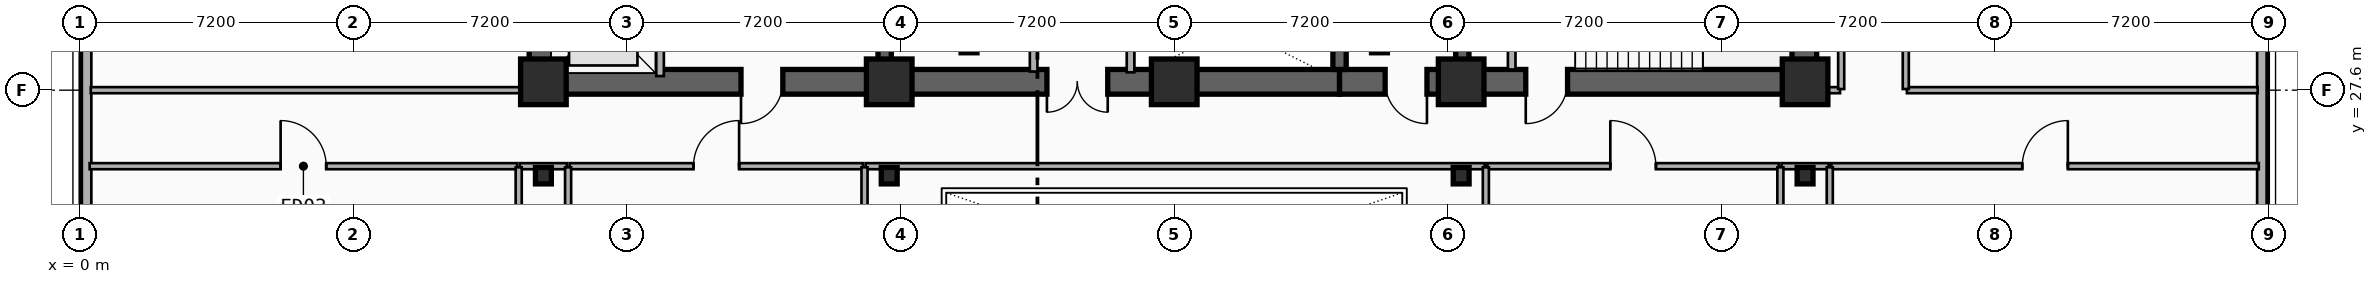
"""IFC4 building model, lengths in metres.
Left out: names, types, materials, properties, quantities, classifications, styles, units other than length and angle.
Written with IfcOpenShell. Run it as: python <this file> out.ifc"""

import sys

from ifc_helpers import new_model, si_unit, direction, frame, frame_2d, origin, origin_2d, place, context, subcontext, project, spatial, rectangle, i_section, extrude, element, fill, save


model = new_model("IFC4")
c1 = context("Model", 3, precision=1e-05, world=origin(), true_north=direction((0.0, 1.0)))
c2 = subcontext(c1, "Body", "Model", "MODEL_VIEW")
j1 = project(units=[si_unit("LENGTHUNIT", "METRE"), si_unit("PLANEANGLEUNIT", "RADIAN")], contexts=[c1])
p1 = place(None, origin())
s1 = spatial("IfcSite", under=j1, at=p1, CompositionType="ELEMENT")
p2 = place(p1, origin())
s2 = spatial("IfcBuilding", under=s1, at=p2, CompositionType="ELEMENT")
p3 = place(p2, frame((0.0, 0.0, 132.9)))
s3 = spatial("IfcBuildingStorey", under=s2, at=p3, CompositionType="ELEMENT", Elevation=132.9)
p4 = place(p3, frame((21.18, 27.82, 0.0), z_axis=(0.0, 0.0, 1.0), x_axis=(-1.0, 0.0, 0.0)))
e1 = element("IfcWall", 1, at=p4, inside=s3, PredefinedType="SHEAR", context=c2, shape_type="SweptSolid", body=[
    extrude(rectangle(XDim=9.03, YDim=0.65, at=frame_2d((4.515, 0.0))), origin(), (0.0, 0.0, 1.0), 4.8),
])
p5 = place(p4, frame((2.68, 0.0, 0.0)))
e2 = element("IfcOpeningElement", 2, at=p5, cuts=e1, PredefinedType="OPENING", context=c2, shape_type="SweptSolid", body=[
    extrude(rectangle(XDim=1.1, YDim=2.15, at=frame_2d((0.55, 1.075))), frame((0.0, 0.335, 0.0), z_axis=(0.0, -1.0, 0.0), x_axis=(1.0, 0.0, 0.0)), (0.0, 0.0, 1.0), 0.67),
])
p6 = place(p3, frame((33.15, 27.82, 0.0), z_axis=(0.0, 0.0, 1.0), x_axis=(-1.0, 0.0, 0.0)))
e3 = element("IfcWall", 3, at=p6, inside=s3, PredefinedType="SHEAR", context=c2, shape_type="SweptSolid", body=[
    extrude(rectangle(XDim=11.97, YDim=0.65, at=frame_2d((5.985, 0.0))), origin(), (0.0, 0.0, 1.0), 4.8),
])
p7 = place(p6, frame((6.1, 0.0, 0.0)))
e4 = element("IfcOpeningElement", 4, at=p7, cuts=e3, PredefinedType="OPENING", context=c2, shape_type="SweptSolid", body=[
    extrude(rectangle(XDim=1.6, YDim=2.2, at=frame_2d((0.8, 1.1))), frame((0.0, 0.335, 0.0), z_axis=(0.0, -1.0, 0.0), x_axis=(1.0, 0.0, 0.0)), (0.0, 0.0, 1.0), 0.67),
])
p8 = place(p3, frame((45.38, 27.82, 0.0), z_axis=(0.0, 0.0, 1.0), x_axis=(-1.0, 0.0, 0.0)))
e5 = element("IfcWall", 5, at=p8, inside=s3, PredefinedType="SHEAR", context=c2, shape_type="SweptSolid", body=[
    extrude(rectangle(XDim=12.23, YDim=0.65, at=frame_2d((6.115, 0.0))), origin(), (0.0, 0.0, 1.0), 4.8),
])
p9 = place(p8, frame((9.93, 0.0, 0.0)))
e6 = element("IfcOpeningElement", 6, at=p9, cuts=e5, PredefinedType="OPENING", context=c2, shape_type="SweptSolid", body=[
    extrude(rectangle(XDim=1.1, YDim=2.15, at=frame_2d((0.55, 1.075))), frame((0.0, 0.335, 0.0), z_axis=(0.0, -1.0, 0.0), x_axis=(1.0, 0.0, 0.0)), (0.0, 0.0, 1.0), 0.67),
])
p10 = place(p8, frame((6.23, 0.0, 0.0)))
e7 = element("IfcOpeningElement", 7, at=p10, cuts=e5, PredefinedType="OPENING", context=c2, shape_type="SweptSolid", body=[
    extrude(rectangle(XDim=1.1, YDim=2.15, at=frame_2d((0.55, 1.075))), frame((0.0, 0.335, 0.0), z_axis=(0.0, -1.0, 0.0), x_axis=(1.0, 0.0, 0.0)), (0.0, 0.0, 1.0), 0.67),
])
for number, where, z_axis, x_axis in (
    (8, (12.15, 28.145, 0.0), (0.0, 0.0, 1.0), (0.0, 1.0, 0.0)),
    (9, (45.38, 28.145, 0.0), (0.0, 0.0, 1.0), (0.0, 1.0, 0.0)),
):
    element("IfcWall", number, at=place(p3, frame(where, z_axis=z_axis, x_axis=x_axis)), inside=s3, PredefinedType="SHEAR", context=c2, shape_type="SweptSolid", body=[
        extrude(rectangle(XDim=8.58, YDim=0.65, at=frame_2d((4.29, 0.0))), origin(), (0.0, 0.0, 1.0), 4.8),
    ])
for number, where, z_axis, x_axis in (
    (10, (21.18, 28.145, 0.0), (0.0, 0.0, 1.0), (0.0, 1.0, 0.0)),
    (11, (33.15, 28.145, 0.0), (0.0, 0.0, 1.0), (0.0, 1.0, 0.0)),
):
    element("IfcWall", number, at=place(p3, frame(where, z_axis=z_axis, x_axis=x_axis)), inside=s3, PredefinedType="SHEAR", context=c2, shape_type="SweptSolid", body=[
        extrude(rectangle(XDim=8.58, YDim=0.35, at=frame_2d((4.29, 0.0))), origin(), (0.0, 0.0, 1.0), 4.8),
    ])
p11 = place(p3, frame((36.38, 28.145, 0.0), z_axis=(0.0, 0.0, 1.0), x_axis=(0.0, 1.0, 0.0)))
e12 = element("IfcWall", 12, at=p11, inside=s3, PredefinedType="SHEAR", context=c2, shape_type="SweptSolid", body=[
    extrude(rectangle(XDim=8.58, YDim=0.35, at=frame_2d((4.29, 0.0))), origin(), (0.0, 0.0, 1.0), 4.8),
])
p12 = place(p11, frame((3.635, 0.0, 0.0)))
e13 = element("IfcOpeningElement", 13, at=p12, cuts=e12, PredefinedType="OPENING", context=c2, shape_type="SweptSolid", body=[
    extrude(rectangle(XDim=1.1, YDim=2.15, at=frame_2d((0.55, 1.075))), frame((0.0, 0.185, 0.0), z_axis=(0.0, -1.0, 0.0), x_axis=(1.0, 0.0, 0.0)), (0.0, 0.0, 1.0), 0.37),
])
for number, where, z_axis, x_axis in (
    (14, (23.4, 28.8, 0.0), (0.0, 0.0, 1.0), (1.0, 0.0, 0.0)),
    (15, (34.2, 28.8, 0.0), (0.0, 0.0, 1.0), (1.0, 0.0, 0.0)),
):
    element("IfcColumn", number, at=place(p3, frame(where, z_axis=z_axis, x_axis=x_axis)), inside=s3, PredefinedType="COLUMN", context=c2, shape_type="SweptSolid", body=[
        extrude(i_section(OverallWidth=0.418, OverallDepth=0.432, WebThickness=0.035, FlangeThickness=0.056, FilletRadius=0.015, at=origin_2d()), origin(), (0.0, 0.0, 1.0), 4.8),
    ])
for number, where, z_axis, x_axis in (
    (16, (12.2, 27.82, 0.0), (0.0, 0.0, 1.0), (1.0, 0.0, 0.0)),
    (17, (21.3, 27.82, 0.0), (0.0, 0.0, 1.0), (1.0, 0.0, 0.0)),
    (18, (28.8, 27.82, 0.0), (0.0, 0.0, 1.0), (1.0, 0.0, 0.0)),
    (19, (36.35, 27.82, 0.0), (0.0, 0.0, 1.0), (1.0, 0.0, 0.0)),
    (20, (45.4, 27.82, 0.0), (0.0, 0.0, 1.0), (1.0, 0.0, 0.0)),
):
    element("IfcColumn", number, at=place(p3, frame(where, z_axis=z_axis, x_axis=x_axis)), inside=s3, PredefinedType="COLUMN", context=c2, shape_type="SweptSolid", body=[
        extrude(rectangle(XDim=1.2, YDim=1.2, at=origin_2d()), origin(), (0.0, 0.0, 1.0), 4.8),
    ])
for number, where, z_axis, x_axis in (
    (21, (12.2, 25.35, 0.0), (0.0, 0.0, 1.0), (1.0, 0.0, 0.0)),
    (22, (21.3, 25.35, 0.0), (0.0, 0.0, 1.0), (1.0, 0.0, 0.0)),
    (23, (36.35, 25.35, 0.0), (0.0, 0.0, 1.0), (1.0, 0.0, 0.0)),
    (24, (45.4, 25.35, 0.0), (0.0, 0.0, 1.0), (1.0, 0.0, 0.0)),
):
    element("IfcColumn", number, at=place(p3, frame(where, z_axis=z_axis, x_axis=x_axis)), inside=s3, PredefinedType="COLUMN", context=c2, shape_type="SweptSolid", body=[
        extrude(i_section(OverallWidth=0.418, OverallDepth=0.432, WebThickness=0.035, FlangeThickness=0.056, FilletRadius=0.015, at=origin_2d()), origin(), (0.0, 0.0, 1.0), 4.8),
    ])
for number, where, z_axis, x_axis in (
    (25, (57.42, 39.0, 0.0), (0.0, 0.0, 1.0), (0.0, -1.0, 0.0)),
    (26, (0.18, 21.0, 0.0), (0.0, 0.0, 1.0), (0.0, 1.0, 0.0)),
):
    element("IfcWall", number, at=place(p3, frame(where, z_axis=z_axis, x_axis=x_axis)), inside=s3, PredefinedType="SOLIDWALL", context=c2, shape_type="SweptSolid", body=[
        extrude(rectangle(XDim=18.0, YDim=0.25, at=frame_2d((9.0, 0.0))), origin(), (0.0, 0.0, 1.0), 4.48),
    ])
p13 = place(p3, frame((15.27, 27.97, 0.0), z_axis=(0.0, 0.0, 1.0), x_axis=(0.0, 1.0, 0.0)))
e27 = element("IfcWall", 27, at=p13, inside=s3, PredefinedType="PARTITIONING", context=c2, shape_type="SweptSolid", body=[
    extrude(rectangle(XDim=2.96, YDim=0.2, at=frame_2d((1.48, 0.0))), origin(), (0.0, 0.0, 1.0), 3.452),
])
p14 = place(p13, frame((0.93, 0.0, 0.0)))
e28 = element("IfcOpeningElement", 28, at=p14, cuts=e27, PredefinedType="OPENING", context=c2, shape_type="SweptSolid", body=[
    extrude(rectangle(XDim=1.1, YDim=2.15, at=frame_2d((0.55, 1.075))), frame((0.0, 0.11, 0.0), z_axis=(0.0, -1.0, 0.0), x_axis=(1.0, 0.0, 0.0)), (0.0, 0.0, 1.0), 0.22),
])
p15 = place(p3, frame((27.65, 28.07, 0.0), z_axis=(0.0, 0.0, 1.0), x_axis=(0.0, 1.0, 0.0)))
e29 = element("IfcWall", 29, at=p15, inside=s3, PredefinedType="PARTITIONING", context=c2, shape_type="SweptSolid", body=[
    extrude(rectangle(XDim=2.58, YDim=0.2, at=frame_2d((1.29, 0.0))), origin(), (0.0, 0.0, 1.0), 3.452),
])
p16 = place(p3, frame((37.68, 28.145, 0.0), z_axis=(0.0, 0.0, 1.0), x_axis=(0.0, 1.0, 0.0)))
e30 = element("IfcWall", 30, at=p16, inside=s3, PredefinedType="PARTITIONING", context=c2, shape_type="SweptSolid", body=[
    extrude(rectangle(XDim=3.105, YDim=0.2, at=frame_2d((1.552, 0.0))), origin(), (0.0, 0.0, 1.0), 3.86),
])
p17 = place(p3, frame((25.1, 28.09, 0.0), z_axis=(0.0, 0.0, 1.0), x_axis=(0.0, 1.0, 0.0)))
e31 = element("IfcWall", 31, at=p17, inside=s3, PredefinedType="PARTITIONING", context=c2, shape_type="SweptSolid", body=[
    extrude(rectangle(XDim=3.82, YDim=0.2, at=frame_2d((1.91, 0.0))), origin(), (0.0, 0.0, 1.0), 3.86),
])
p18 = place(p17, frame((1.31, 0.0, 0.0)))
e32 = element("IfcOpeningElement", 32, at=p18, cuts=e31, PredefinedType="OPENING", context=c2, shape_type="SweptSolid", body=[
    extrude(rectangle(XDim=1.2, YDim=2.15, at=frame_2d((0.6, 1.075))), frame((0.0, 0.11, 0.0), z_axis=(0.0, -1.0, 0.0), x_axis=(1.0, 0.0, 0.0)), (0.0, 0.0, 1.0), 0.22),
])
p19 = place(p3, frame((0.26, 25.6, 0.0), z_axis=(0.0, 0.0, 1.0), x_axis=(1.0, 0.0, 0.0)))
e33 = element("IfcWall", 33, at=p19, inside=s3, PredefinedType="PARTITIONING", context=c2, shape_type="SweptSolid", body=[
    extrude(rectangle(XDim=11.25, YDim=0.16, at=frame_2d((5.625, 0.0))), origin(), (0.0, 0.0, 1.0), 3.81),
])
p20 = place(p19, frame((5.025, 0.0, 0.0)))
e34 = element("IfcOpeningElement", 34, at=p20, cuts=e33, PredefinedType="OPENING", context=c2, shape_type="SweptSolid", body=[
    extrude(rectangle(XDim=1.2, YDim=2.15, at=frame_2d((0.6, 1.075))), frame((0.0, 0.09, 0.0), z_axis=(0.0, -1.0, 0.0), x_axis=(1.0, 0.0, 0.0)), (0.0, 0.0, 1.0), 0.18),
])
p21 = place(p3, frame((12.89, 25.6, 0.0), z_axis=(0.0, 0.0, 1.0), x_axis=(1.0, 0.0, 0.0)))
e35 = element("IfcWall", 35, at=p21, inside=s3, PredefinedType="PARTITIONING", context=c2, shape_type="SweptSolid", body=[
    extrude(rectangle(XDim=7.72, YDim=0.16, at=frame_2d((3.86, 0.0))), origin(), (0.0, 0.0, 1.0), 4.48),
])
p22 = place(p21, frame((3.26, 0.0, 0.0)))
e36 = element("IfcOpeningElement", 36, at=p22, cuts=e35, PredefinedType="OPENING", context=c2, shape_type="SweptSolid", body=[
    extrude(rectangle(XDim=1.2, YDim=2.15, at=frame_2d((0.6, 1.075))), frame((0.0, 0.09, 0.0), z_axis=(0.0, -1.0, 0.0), x_axis=(1.0, 0.0, 0.0)), (0.0, 0.0, 1.0), 0.18),
])
p23 = place(p3, frame((37.04, 25.6, 0.0), z_axis=(0.0, 0.0, 1.0), x_axis=(1.0, 0.0, 0.0)))
e37 = element("IfcWall", 37, at=p23, inside=s3, PredefinedType="PARTITIONING", context=c2, shape_type="SweptSolid", body=[
    extrude(rectangle(XDim=7.67, YDim=0.16, at=frame_2d((3.835, 0.0))), origin(), (0.0, 0.0, 1.0), 4.48),
])
p24 = place(p23, frame((3.235, 0.0, 0.0)))
e38 = element("IfcOpeningElement", 38, at=p24, cuts=e37, PredefinedType="OPENING", context=c2, shape_type="SweptSolid", body=[
    extrude(rectangle(XDim=1.2, YDim=2.15, at=frame_2d((0.6, 1.075))), frame((0.0, 0.09, 0.0), z_axis=(0.0, -1.0, 0.0), x_axis=(1.0, 0.0, 0.0)), (0.0, 0.0, 1.0), 0.18),
])
p25 = place(p3, frame((46.09, 25.6, 0.0), z_axis=(0.0, 0.0, 1.0), x_axis=(1.0, 0.0, 0.0)))
e39 = element("IfcWall", 39, at=p25, inside=s3, PredefinedType="PARTITIONING", context=c2, shape_type="SweptSolid", body=[
    extrude(rectangle(XDim=11.25, YDim=0.16, at=frame_2d((5.625, 0.0))), origin(), (0.0, 0.0, 1.0), 3.81),
])
p26 = place(p25, frame((5.025, 0.0, 0.0)))
e40 = element("IfcOpeningElement", 40, at=p26, cuts=e39, PredefinedType="OPENING", context=c2, shape_type="SweptSolid", body=[
    extrude(rectangle(XDim=1.2, YDim=2.15, at=frame_2d((0.6, 1.075))), frame((0.0, 0.09, 0.0), z_axis=(0.0, -1.0, 0.0), x_axis=(1.0, 0.0, 0.0)), (0.0, 0.0, 1.0), 0.18),
])
p27 = place(p3, frame((11.58, 25.6, 0.0), z_axis=(0.0, 0.0, 1.0), x_axis=(1.0, 0.0, 0.0)))
e41 = element("IfcWall", 41, at=p27, inside=s3, PredefinedType="PARTITIONING", context=c2, shape_type="SweptSolid", body=[
    extrude(rectangle(XDim=1.24, YDim=0.16, at=frame_2d((0.62, 0.0))), origin(), (0.0, 0.0, 1.0), 3.646),
])
p28 = place(p3, frame((20.68, 25.6, 0.0), z_axis=(0.0, 0.0, 1.0), x_axis=(1.0, 0.0, 0.0)))
e42 = element("IfcWall", 42, at=p28, inside=s3, PredefinedType="PARTITIONING", context=c2, shape_type="SweptSolid", body=[
    extrude(rectangle(XDim=16.29, YDim=0.16, at=frame_2d((8.145, 0.0))), origin(), (0.0, 0.0, 1.0), 3.646),
])
p29 = place(p3, frame((44.78, 25.6, 0.0), z_axis=(0.0, 0.0, 1.0), x_axis=(1.0, 0.0, 0.0)))
e43 = element("IfcWall", 43, at=p29, inside=s3, PredefinedType="PARTITIONING", context=c2, shape_type="SweptSolid", body=[
    extrude(rectangle(XDim=1.24, YDim=0.16, at=frame_2d((0.62, 0.0))), origin(), (0.0, 0.0, 1.0), 3.646),
])
p30 = place(p3, frame((0.29, 27.6, 0.0), z_axis=(0.0, 0.0, 1.0), x_axis=(1.0, 0.0, 0.0)))
e44 = element("IfcWall", 44, at=p30, inside=s3, PredefinedType="PARTITIONING", context=c2, shape_type="SweptSolid", body=[
    extrude(rectangle(XDim=11.83, YDim=0.16, at=frame_2d((5.915, 0.0))), origin(), (0.0, 0.0, 1.0), 3.452),
])
p31 = place(p3, frame((45.41, 27.6, 0.0), z_axis=(0.0, 0.0, 1.0), x_axis=(1.0, 0.0, 0.0)))
e45 = element("IfcWall", 45, at=p31, inside=s3, PredefinedType="PARTITIONING", context=c2, shape_type="SweptSolid", body=[
    extrude(rectangle(XDim=0.91, YDim=0.16, at=frame_2d((0.455, 0.0))), origin(), (0.0, 0.0, 1.0), 3.452),
])
p32 = place(p3, frame((48.08, 27.6, 0.0), z_axis=(0.0, 0.0, 1.0), x_axis=(1.0, 0.0, 0.0)))
e46 = element("IfcWall", 46, at=p32, inside=s3, PredefinedType="PARTITIONING", context=c2, shape_type="SweptSolid", body=[
    extrude(rectangle(XDim=9.23, YDim=0.16, at=frame_2d((4.615, 0.0))), origin(), (0.0, 0.0, 1.0), 3.81),
])
for number, where, z_axis, x_axis in (
    (47, (46.35, 27.63, 0.0), (0.0, 0.0, 1.0), (0.0, 1.0, 0.0)),
    (48, (48.05, 27.63, 0.0), (0.0, 0.0, 1.0), (0.0, 1.0, 0.0)),
):
    element("IfcWall", number, at=place(p3, frame(where, z_axis=z_axis, x_axis=x_axis)), inside=s3, PredefinedType="PARTITIONING", context=c2, shape_type="SweptSolid", body=[
        extrude(rectangle(XDim=10.24, YDim=0.16, at=frame_2d((5.12, 0.0))), origin(), (0.0, 0.0, 1.0), 3.96),
    ])
p33 = place(p3, frame((11.55, 17.09, 0.0), z_axis=(0.0, 0.0, 1.0), x_axis=(0.0, 1.0, 0.0)))
e49 = element("IfcWall", 49, at=p33, inside=s3, PredefinedType="PARTITIONING", context=c2, shape_type="SweptSolid", body=[
    extrude(rectangle(XDim=8.48, YDim=0.16, at=frame_2d((4.24, 0.0))), origin(), (0.0, 0.0, 1.0), 3.96),
])
for number, where, z_axis, x_axis in (
    (50, (12.85, 17.09, 0.0), (0.0, 0.0, 1.0), (0.0, 1.0, 0.0)),
    (51, (20.65, 17.09, 0.0), (0.0, 0.0, 1.0), (0.0, 1.0, 0.0)),
    (52, (37.0, 17.09, 0.0), (0.0, 0.0, 1.0), (0.0, 1.0, 0.0)),
    (53, (44.75, 17.09, 0.0), (0.0, 0.0, 1.0), (0.0, 1.0, 0.0)),
):
    element("IfcWall", number, at=place(p3, frame(where, z_axis=z_axis, x_axis=x_axis)), inside=s3, PredefinedType="PARTITIONING", context=c2, shape_type="SweptSolid", body=[
        extrude(rectangle(XDim=8.48, YDim=0.16, at=frame_2d((4.24, 0.0))), origin(), (0.0, 0.0, 1.0), 3.97),
    ])
p34 = place(p3, frame((46.05, 17.09, 0.0), z_axis=(0.0, 0.0, 1.0), x_axis=(0.0, 1.0, 0.0)))
e54 = element("IfcWall", 54, at=p34, inside=s3, PredefinedType="PARTITIONING", context=c2, shape_type="SweptSolid", body=[
    extrude(rectangle(XDim=8.48, YDim=0.16, at=frame_2d((4.24, 0.0))), origin(), (0.0, 0.0, 1.0), 3.96),
])
p35 = place(p5, origin())
e55 = element("IfcDoor", 55, at=p35, inside=s3, OperationType="SINGLE_SWING_RIGHT", PredefinedType="DOOR", context=c2, shape_type="SweptSolid", body=[
    extrude(rectangle(XDim=1.1, YDim=2.15, at=frame_2d((0.55, 1.075))), frame((0.0, 0.025, 0.0), z_axis=(0.0, -1.0, 0.0), x_axis=(1.0, 0.0, 0.0)), (0.0, 0.0, 1.0), 0.05),
])
fill(e2, e55)
p36 = place(p9, origin())
e56 = element("IfcDoor", 56, at=p36, inside=s3, OperationType="SINGLE_SWING_LEFT", PredefinedType="DOOR", context=c2, shape_type="SweptSolid", body=[
    extrude(rectangle(XDim=1.1, YDim=2.15, at=frame_2d((0.55, 1.075))), frame((0.0, 0.025, 0.0), z_axis=(0.0, -1.0, 0.0), x_axis=(1.0, 0.0, 0.0)), (0.0, 0.0, 1.0), 0.05),
])
fill(e6, e56)
p37 = place(p10, origin())
e57 = element("IfcDoor", 57, at=p37, inside=s3, OperationType="SINGLE_SWING_RIGHT", PredefinedType="DOOR", context=c2, shape_type="SweptSolid", body=[
    extrude(rectangle(XDim=1.1, YDim=2.15, at=frame_2d((0.55, 1.075))), frame((0.0, 0.025, 0.0), z_axis=(0.0, -1.0, 0.0), x_axis=(1.0, 0.0, 0.0)), (0.0, 0.0, 1.0), 0.05),
])
fill(e7, e57)
p38 = place(p7, origin())
e58 = element("IfcDoor", 58, at=p38, inside=s3, OperationType="SINGLE_SWING_LEFT", PredefinedType="DOOR", context=c2, shape_type="SweptSolid", body=[
    extrude(rectangle(XDim=1.6, YDim=2.2, at=frame_2d((0.8, 1.1))), frame((0.0, 0.025, 0.0), z_axis=(0.0, -1.0, 0.0), x_axis=(1.0, 0.0, 0.0)), (0.0, 0.0, 1.0), 0.05),
])
fill(e4, e58)
p39 = place(p20, origin())
e59 = element("IfcDoor", 59, at=p39, inside=s3, OperationType="SINGLE_SWING_LEFT", PredefinedType="DOOR", context=c2, shape_type="SweptSolid", body=[
    extrude(rectangle(XDim=1.2, YDim=2.15, at=frame_2d((0.6, 1.075))), frame((0.0, 0.025, 0.0), z_axis=(0.0, -1.0, 0.0), x_axis=(1.0, 0.0, 0.0)), (0.0, 0.0, 1.0), 0.05),
])
fill(e34, e59)
p40 = place(p22, origin())
e60 = element("IfcDoor", 60, at=p40, inside=s3, OperationType="SINGLE_SWING_RIGHT", PredefinedType="DOOR", context=c2, shape_type="SweptSolid", body=[
    extrude(rectangle(XDim=1.2, YDim=2.15, at=frame_2d((0.6, 1.075))), frame((0.0, 0.025, 0.0), z_axis=(0.0, -1.0, 0.0), x_axis=(1.0, 0.0, 0.0)), (0.0, 0.0, 1.0), 0.05),
])
fill(e36, e60)
p41 = place(p24, origin())
e61 = element("IfcDoor", 61, at=p41, inside=s3, OperationType="SINGLE_SWING_LEFT", PredefinedType="DOOR", context=c2, shape_type="SweptSolid", body=[
    extrude(rectangle(XDim=1.2, YDim=2.15, at=frame_2d((0.6, 1.075))), frame((0.0, 0.025, 0.0), z_axis=(0.0, -1.0, 0.0), x_axis=(1.0, 0.0, 0.0)), (0.0, 0.0, 1.0), 0.05),
])
fill(e38, e61)
p42 = place(p26, origin())
e62 = element("IfcDoor", 62, at=p42, inside=s3, OperationType="SINGLE_SWING_RIGHT", PredefinedType="DOOR", context=c2, shape_type="SweptSolid", body=[
    extrude(rectangle(XDim=1.2, YDim=2.15, at=frame_2d((0.6, 1.075))), frame((0.0, 0.025, 0.0), z_axis=(0.0, -1.0, 0.0), x_axis=(1.0, 0.0, 0.0)), (0.0, 0.0, 1.0), 0.05),
])
fill(e40, e62)
save(model, sys.argv[1])
